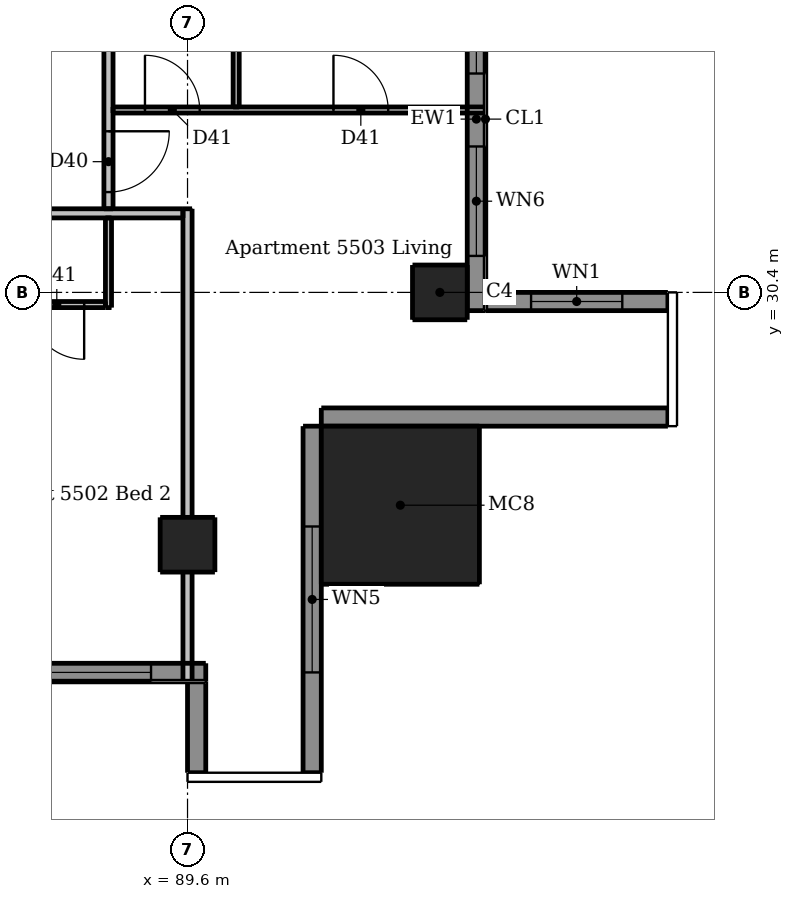
"""IFC4 building model, lengths in metres.
Left out: names, types, materials, properties, quantities, classifications, styles, units other than length and angle.
Written with IfcOpenShell. Run it as: python <this file> out.ifc"""

import sys

from ifc_helpers import new_model, si_unit, direction, frame, frame_2d, origin, origin_2d, place, context, subcontext, project, spatial, rectangle, extrude, element, fill, save


model = new_model("IFC4")
c1 = context("Model", 3, precision=1e-05, world=origin(), true_north=direction((0.0, 1.0)))
c2 = subcontext(c1, "Body", "Model", "MODEL_VIEW")
j1 = project(units=[si_unit("LENGTHUNIT", "METRE"), si_unit("PLANEANGLEUNIT", "RADIAN")], contexts=[c1])
p1 = place(None, origin())
s1 = spatial("IfcSite", under=j1, at=p1, CompositionType="ELEMENT")
p2 = place(p1, origin())
s2 = spatial("IfcBuilding", under=s1, at=p2, CompositionType="ELEMENT")
p3 = place(p2, frame((0.0, 0.0, 206.8)))
s3 = spatial("IfcBuildingStorey", under=s2, at=p3, CompositionType="ELEMENT", Elevation=206.8)
for number, where, z_axis, x_axis in (
    (1, (89.6, 26.25, 0.0), (0.0, 0.0, 1.0), (1.0, 0.0, 0.0)),
    (2, (93.75, 30.4, 0.0), (0.0, 0.0, 1.0), (1.0, 0.0, 0.0)),
):
    element("IfcColumn", number, at=place(p3, frame(where, z_axis=z_axis, x_axis=x_axis)), inside=s3, PredefinedType="COLUMN", context=c2, shape_type="SweptSolid", body=[
        extrude(rectangle(XDim=0.9, YDim=0.9, at=origin_2d()), origin(), (0.0, 0.0, 1.0), 3.05),
    ])
p4 = place(p3, frame((93.1, 26.9, 0.0), z_axis=(0.0, 0.0, 1.0), x_axis=(1.0, 0.0, 0.0)))
e3 = element("IfcColumn", 3, at=p4, inside=s3, PredefinedType="COLUMN", context=c2, shape_type="SweptSolid", body=[
    extrude(rectangle(XDim=2.6, YDim=2.6, at=origin_2d()), origin(), (0.0, 0.0, 1.0), 3.3),
])
p5 = place(p3, frame((89.75, 24.0, 0.0), z_axis=(0.0, 0.0, 1.0), x_axis=(0.0, -1.0, 0.0)))
e4 = element("IfcWall", 4, at=p5, inside=s3, PredefinedType="SOLIDWALL", context=c2, shape_type="SweptSolid", body=[
    extrude(rectangle(XDim=1.5, YDim=0.3, at=frame_2d((0.75, 0.0))), origin(), (0.0, 0.0, 1.0), 3.05),
])
p6 = place(p3, frame((91.65, 22.5, 0.0), z_axis=(0.0, 0.0, 1.0), x_axis=(0.0, 1.0, 0.0)))
e5 = element("IfcWall", 5, at=p6, inside=s3, PredefinedType="SOLIDWALL", context=c2, shape_type="SweptSolid", body=[
    extrude(rectangle(XDim=5.7, YDim=0.3, at=frame_2d((2.85, 0.0))), origin(), (0.0, 0.0, 1.0), 3.05),
])
p7 = place(p6, frame((1.65, 0.0, 0.15)))
e6 = element("IfcOpeningElement", 6, at=p7, cuts=e5, PredefinedType="OPENING", context=c2, shape_type="SweptSolid", body=[
    extrude(rectangle(XDim=2.4, YDim=2.1, at=frame_2d((1.2, 1.05))), frame((0.0, 0.16, 0.0), z_axis=(0.0, -1.0, 0.0), x_axis=(1.0, 0.0, 0.0)), (0.0, 0.0, 1.0), 0.32),
])
p8 = place(p3, frame((91.8, 28.35, 0.0), z_axis=(0.0, 0.0, 1.0), x_axis=(1.0, 0.0, 0.0)))
e7 = element("IfcWall", 7, at=p8, inside=s3, PredefinedType="SOLIDWALL", context=c2, shape_type="SweptSolid", body=[
    extrude(rectangle(XDim=5.7, YDim=0.3, at=frame_2d((2.85, 0.0))), origin(), (0.0, 0.0, 1.0), 3.05),
])
p9 = place(p3, frame((97.5, 30.25, 0.0), z_axis=(0.0, 0.0, 1.0), x_axis=(-1.0, 0.0, 0.0)))
e8 = element("IfcWall", 8, at=p9, inside=s3, PredefinedType="SOLIDWALL", context=c2, shape_type="SweptSolid", body=[
    extrude(rectangle(XDim=3.0, YDim=0.3, at=frame_2d((1.5, 0.0))), origin(), (0.0, 0.0, 1.0), 3.05),
])
p10 = place(p9, frame((0.75, 0.0, 0.9)))
e9 = element("IfcOpeningElement", 9, at=p10, cuts=e8, PredefinedType="OPENING", context=c2, shape_type="SweptSolid", body=[
    extrude(rectangle(XDim=1.5, YDim=1.5, at=frame_2d((0.75, 0.75))), frame((0.0, 0.16, 0.0), z_axis=(0.0, -1.0, 0.0), x_axis=(1.0, 0.0, 0.0)), (0.0, 0.0, 1.0), 0.32),
])
p11 = place(p3, frame((83.6, 24.15, 0.0), z_axis=(0.0, 0.0, 1.0), x_axis=(1.0, 0.0, 0.0)))
e10 = element("IfcWall", 10, at=p11, inside=s3, PredefinedType="SOLIDWALL", context=c2, shape_type="SweptSolid", body=[
    extrude(rectangle(XDim=6.3, YDim=0.3, at=frame_2d((3.15, 0.0))), origin(), (0.0, 0.0, 1.0), 3.05),
])
p12 = place(p11, frame((0.6, 0.0, 0.15)))
e11 = element("IfcOpeningElement", 11, at=p12, cuts=e10, PredefinedType="OPENING", context=c2, shape_type="SweptSolid", body=[
    extrude(rectangle(XDim=1.8, YDim=2.1, at=frame_2d((0.9, 1.05))), frame((0.0, 0.16, 0.0), z_axis=(0.0, -1.0, 0.0), x_axis=(1.0, 0.0, 0.0)), (0.0, 0.0, 1.0), 0.32),
])
p13 = place(p11, frame((3.6, 0.0, 0.15)))
e12 = element("IfcOpeningElement", 12, at=p13, cuts=e10, PredefinedType="OPENING", context=c2, shape_type="SweptSolid", body=[
    extrude(rectangle(XDim=1.8, YDim=2.1, at=frame_2d((0.9, 1.05))), frame((0.0, 0.16, 0.0), z_axis=(0.0, -1.0, 0.0), x_axis=(1.0, 0.0, 0.0)), (0.0, 0.0, 1.0), 0.32),
])
p14 = place(p3, frame((94.35, 30.1, 0.0), z_axis=(0.0, 0.0, 1.0), x_axis=(0.0, 1.0, 0.0)))
e13 = element("IfcWall", 13, at=p14, inside=s3, PredefinedType="SOLIDWALL", context=c2, shape_type="SweptSolid", body=[
    extrude(rectangle(XDim=6.3, YDim=0.3, at=frame_2d((3.15, 0.0))), origin(), (0.0, 0.0, 1.0), 3.05),
])
p15 = place(p14, frame((0.9, 0.0, 0.15)))
e14 = element("IfcOpeningElement", 14, at=p15, cuts=e13, PredefinedType="OPENING", context=c2, shape_type="SweptSolid", body=[
    extrude(rectangle(XDim=1.8, YDim=2.1, at=frame_2d((0.9, 1.05))), frame((0.0, 0.16, 0.0), z_axis=(0.0, -1.0, 0.0), x_axis=(1.0, 0.0, 0.0)), (0.0, 0.0, 1.0), 0.32),
])
p16 = place(p14, frame((3.9, 0.0, 0.15)))
e15 = element("IfcOpeningElement", 15, at=p16, cuts=e13, PredefinedType="OPENING", context=c2, shape_type="SweptSolid", body=[
    extrude(rectangle(XDim=1.8, YDim=2.1, at=frame_2d((0.9, 1.05))), frame((0.0, 0.16, 0.0), z_axis=(0.0, -1.0, 0.0), x_axis=(1.0, 0.0, 0.0)), (0.0, 0.0, 1.0), 0.32),
])
p17 = place(p3, frame((88.3, 30.15, 0.0), z_axis=(0.0, 0.0, 1.0), x_axis=(0.0, 1.0, 0.0)))
e16 = element("IfcWall", 16, at=p17, inside=s3, PredefinedType="PARTITIONING", context=c2, shape_type="SweptSolid", body=[
    extrude(rectangle(XDim=1.475, YDim=0.1, at=frame_2d((0.738, 0.0))), origin(), (0.0, 0.0, 1.0), 3.05),
])
p18 = place(p3, frame((90.4, 33.45, 0.0), z_axis=(0.0, 0.0, 1.0), x_axis=(0.0, 1.0, 0.0)))
e17 = element("IfcWall", 17, at=p18, inside=s3, PredefinedType="PARTITIONING", context=c2, shape_type="SweptSolid", body=[
    extrude(rectangle(XDim=5.875, YDim=0.1, at=frame_2d((2.938, 0.0))), origin(), (0.0, 0.0, 1.0), 3.05),
])
p19 = place(p18, frame((3.75, 0.0, 0.0)))
e18 = element("IfcOpeningElement", 18, at=p19, cuts=e17, PredefinedType="OPENING", context=c2, shape_type="SweptSolid", body=[
    extrude(rectangle(XDim=0.8, YDim=2.1, at=frame_2d((0.4, 1.05))), frame((0.0, 0.06, 0.0), z_axis=(0.0, -1.0, 0.0), x_axis=(1.0, 0.0, 0.0)), (0.0, 0.0, 1.0), 0.12),
])
p20 = place(p3, frame((88.375, 33.4, 0.0), z_axis=(0.0, 0.0, 1.0), x_axis=(1.0, 0.0, 0.0)))
e19 = element("IfcWall", 19, at=p20, inside=s3, PredefinedType="PARTITIONING", context=c2, shape_type="SweptSolid", body=[
    extrude(rectangle(XDim=6.125, YDim=0.1, at=frame_2d((3.062, 0.0))), origin(), (0.0, 0.0, 1.0), 3.05),
])
p21 = place(p20, frame((0.525, 0.0, 0.0)))
e20 = element("IfcOpeningElement", 20, at=p21, cuts=e19, PredefinedType="OPENING", context=c2, shape_type="SweptSolid", body=[
    extrude(rectangle(XDim=0.9, YDim=2.1, at=frame_2d((0.45, 1.05))), frame((0.0, 0.06, 0.0), z_axis=(0.0, -1.0, 0.0), x_axis=(1.0, 0.0, 0.0)), (0.0, 0.0, 1.0), 0.12),
])
p22 = place(p20, frame((3.625, 0.0, 0.0)))
e21 = element("IfcOpeningElement", 21, at=p22, cuts=e19, PredefinedType="OPENING", context=c2, shape_type="SweptSolid", body=[
    extrude(rectangle(XDim=0.9, YDim=2.1, at=frame_2d((0.45, 1.05))), frame((0.0, 0.06, 0.0), z_axis=(0.0, -1.0, 0.0), x_axis=(1.0, 0.0, 0.0)), (0.0, 0.0, 1.0), 0.12),
])
p23 = place(p3, frame((88.25, 30.2, 0.0), z_axis=(0.0, 0.0, 1.0), x_axis=(-1.0, 0.0, 0.0)))
e22 = element("IfcWall", 22, at=p23, inside=s3, PredefinedType="PARTITIONING", context=c2, shape_type="SweptSolid", body=[
    extrude(rectangle(XDim=16.575, YDim=0.1, at=frame_2d((8.288, 0.0))), origin(), (0.0, 0.0, 1.0), 3.05),
])
p24 = place(p23, frame((13.15, 0.0, 0.0)))
e23 = element("IfcOpeningElement", 23, at=p24, cuts=e22, PredefinedType="OPENING", context=c2, shape_type="SweptSolid", body=[
    extrude(rectangle(XDim=0.9, YDim=2.1, at=frame_2d((0.45, 1.05))), frame((0.0, 0.06, 0.0), z_axis=(0.0, -1.0, 0.0), x_axis=(1.0, 0.0, 0.0)), (0.0, 0.0, 1.0), 0.12),
])
p25 = place(p23, frame((8.6, 0.0, 0.0)))
e24 = element("IfcOpeningElement", 24, at=p25, cuts=e22, PredefinedType="OPENING", context=c2, shape_type="SweptSolid", body=[
    extrude(rectangle(XDim=0.9, YDim=2.1, at=frame_2d((0.45, 1.05))), frame((0.0, 0.06, 0.0), z_axis=(0.0, -1.0, 0.0), x_axis=(1.0, 0.0, 0.0)), (0.0, 0.0, 1.0), 0.12),
])
p26 = place(p23, frame((2.95, 0.0, 0.0)))
e25 = element("IfcOpeningElement", 25, at=p26, cuts=e22, PredefinedType="OPENING", context=c2, shape_type="SweptSolid", body=[
    extrude(rectangle(XDim=0.9, YDim=2.1, at=frame_2d((0.45, 1.05))), frame((0.0, 0.06, 0.0), z_axis=(0.0, -1.0, 0.0), x_axis=(1.0, 0.0, 0.0)), (0.0, 0.0, 1.0), 0.12),
])
p27 = place(p23, frame((0.35, 0.0, 0.0)))
e26 = element("IfcOpeningElement", 26, at=p27, cuts=e22, PredefinedType="OPENING", context=c2, shape_type="SweptSolid", body=[
    extrude(rectangle(XDim=0.9, YDim=2.1, at=frame_2d((0.45, 1.05))), frame((0.0, 0.06, 0.0), z_axis=(0.0, -1.0, 0.0), x_axis=(1.0, 0.0, 0.0)), (0.0, 0.0, 1.0), 0.12),
])
p28 = place(p23, frame((5.95, 0.0, 0.0)))
e27 = element("IfcOpeningElement", 27, at=p28, cuts=e22, PredefinedType="OPENING", context=c2, shape_type="SweptSolid", body=[
    extrude(rectangle(XDim=0.8, YDim=2.1, at=frame_2d((0.4, 1.05))), frame((0.0, 0.06, 0.0), z_axis=(0.0, -1.0, 0.0), x_axis=(1.0, 0.0, 0.0)), (0.0, 0.0, 1.0), 0.12),
])
p29 = place(p3, frame((88.3, 61.175, 0.0), z_axis=(0.0, 0.0, 1.0), x_axis=(0.0, -1.0, 0.0)))
e28 = element("IfcWall", 28, at=p29, inside=s3, PredefinedType="PARTITIONING", context=c2, shape_type="SweptSolid", body=[
    extrude(rectangle(XDim=29.4, YDim=0.15, at=frame_2d((14.7, 0.0))), origin(), (0.0, 0.0, 1.0), 3.05),
])
p30 = place(p29, frame((28.125, 0.0, 0.0)))
e29 = element("IfcOpeningElement", 29, at=p30, cuts=e28, PredefinedType="OPENING", context=c2, shape_type="SweptSolid", body=[
    extrude(rectangle(XDim=1.0, YDim=2.1, at=frame_2d((0.5, 1.05))), frame((0.0, 0.085, 0.0), z_axis=(0.0, -1.0, 0.0), x_axis=(1.0, 0.0, 0.0)), (0.0, 0.0, 1.0), 0.17),
])
p31 = place(p29, frame((10.775, 0.0, 0.0)))
e30 = element("IfcOpeningElement", 30, at=p31, cuts=e28, PredefinedType="OPENING", context=c2, shape_type="SweptSolid", body=[
    extrude(rectangle(XDim=1.0, YDim=2.1, at=frame_2d((0.5, 1.05))), frame((0.0, 0.085, 0.0), z_axis=(0.0, -1.0, 0.0), x_axis=(1.0, 0.0, 0.0)), (0.0, 0.0, 1.0), 0.17),
])
p32 = place(p3, frame((89.6, 24.0, 0.0), z_axis=(0.0, 0.0, 1.0), x_axis=(0.0, 1.0, 0.0)))
e31 = element("IfcWall", 31, at=p32, inside=s3, PredefinedType="PARTITIONING", context=c2, shape_type="SweptSolid", body=[
    extrude(rectangle(XDim=7.775, YDim=0.15, at=frame_2d((3.887, 0.0))), origin(), (0.0, 0.0, 1.0), 2.516),
])
p33 = place(p3, frame((89.525, 31.7, 0.0), z_axis=(0.0, 0.0, 1.0), x_axis=(-1.0, 0.0, 0.0)))
e32 = element("IfcWall", 32, at=p33, inside=s3, PredefinedType="PARTITIONING", context=c2, shape_type="SweptSolid", body=[
    extrude(rectangle(XDim=30.55, YDim=0.15, at=frame_2d((15.275, 0.0))), origin(), (0.0, 0.0, 1.0), 3.05),
])
p34 = place(p33, frame((26.775, 0.0, 0.0)))
e33 = element("IfcOpeningElement", 33, at=p34, cuts=e32, PredefinedType="OPENING", context=c2, shape_type="SweptSolid", body=[
    extrude(rectangle(XDim=1.0, YDim=2.1, at=frame_2d((0.5, 1.05))), frame((0.0, 0.085, 0.0), z_axis=(0.0, -1.0, 0.0), x_axis=(1.0, 0.0, 0.0)), (0.0, 0.0, 1.0), 0.17),
])
p35 = place(p33, frame((9.075, 0.0, 0.0)))
e34 = element("IfcOpeningElement", 34, at=p35, cuts=e32, PredefinedType="OPENING", context=c2, shape_type="SweptSolid", body=[
    extrude(rectangle(XDim=1.0, YDim=2.1, at=frame_2d((0.5, 1.05))), frame((0.0, 0.085, 0.0), z_axis=(0.0, -1.0, 0.0), x_axis=(1.0, 0.0, 0.0)), (0.0, 0.0, 1.0), 0.17),
])
p36 = place(p7, origin())
e35 = element("IfcWindow", 35, at=p36, inside=s3, PartitioningType="DOUBLE_PANEL_VERTICAL", PredefinedType="WINDOW", context=c2, shape_type="SweptSolid", body=[
    extrude(rectangle(XDim=2.4, YDim=2.1, at=frame_2d((1.2, 1.05))), frame((0.0, 0.03, 0.0), z_axis=(0.0, -1.0, 0.0), x_axis=(1.0, 0.0, 0.0)), (0.0, 0.0, 1.0), 0.06),
])
fill(e6, e35)
p37 = place(p10, origin())
e36 = element("IfcWindow", 36, at=p37, inside=s3, PartitioningType="DOUBLE_PANEL_VERTICAL", PredefinedType="WINDOW", context=c2, shape_type="SweptSolid", body=[
    extrude(rectangle(XDim=1.5, YDim=1.5, at=frame_2d((0.75, 0.75))), frame((0.0, 0.03, 0.0), z_axis=(0.0, -1.0, 0.0), x_axis=(1.0, 0.0, 0.0)), (0.0, 0.0, 1.0), 0.06),
])
fill(e9, e36)
p38 = place(p13, origin())
e37 = element("IfcWindow", 37, at=p38, inside=s3, PartitioningType="DOUBLE_PANEL_VERTICAL", PredefinedType="WINDOW", context=c2, shape_type="SweptSolid", body=[
    extrude(rectangle(XDim=1.8, YDim=2.1, at=frame_2d((0.9, 1.05))), frame((0.0, 0.03, 0.0), z_axis=(0.0, -1.0, 0.0), x_axis=(1.0, 0.0, 0.0)), (0.0, 0.0, 1.0), 0.06),
])
fill(e12, e37)
p39 = place(p15, origin())
e38 = element("IfcWindow", 38, at=p39, inside=s3, PartitioningType="DOUBLE_PANEL_VERTICAL", PredefinedType="WINDOW", context=c2, shape_type="SweptSolid", body=[
    extrude(rectangle(XDim=1.8, YDim=2.1, at=frame_2d((0.9, 1.05))), frame((0.0, 0.03, 0.0), z_axis=(0.0, -1.0, 0.0), x_axis=(1.0, 0.0, 0.0)), (0.0, 0.0, 1.0), 0.06),
])
fill(e14, e38)
p40 = place(p16, origin())
e39 = element("IfcWindow", 39, at=p40, inside=s3, PartitioningType="DOUBLE_PANEL_VERTICAL", PredefinedType="WINDOW", context=c2, shape_type="SweptSolid", body=[
    extrude(rectangle(XDim=1.8, YDim=2.1, at=frame_2d((0.9, 1.05))), frame((0.0, 0.03, 0.0), z_axis=(0.0, -1.0, 0.0), x_axis=(1.0, 0.0, 0.0)), (0.0, 0.0, 1.0), 0.06),
])
fill(e15, e39)
p41 = place(p27, origin())
e40 = element("IfcDoor", 40, at=p41, inside=s3, OperationType="SINGLE_SWING_LEFT", PredefinedType="DOOR", context=c2, shape_type="SweptSolid", body=[
    extrude(rectangle(XDim=0.9, YDim=2.1, at=frame_2d((0.45, 1.05))), frame((0.0, 0.025, 0.0), z_axis=(0.0, -1.0, 0.0), x_axis=(1.0, 0.0, 0.0)), (0.0, 0.0, 1.0), 0.05),
])
fill(e26, e40)
p42 = place(p30, origin())
e41 = element("IfcDoor", 41, at=p42, inside=s3, OperationType="SINGLE_SWING_LEFT", PredefinedType="DOOR", context=c2, shape_type="SweptSolid", body=[
    extrude(rectangle(XDim=1.0, YDim=2.1, at=frame_2d((0.5, 1.05))), frame((0.0, 0.025, 0.0), z_axis=(0.0, -1.0, 0.0), x_axis=(1.0, 0.0, 0.0)), (0.0, 0.0, 1.0), 0.05),
])
fill(e29, e41)
p43 = place(p21, origin())
e42 = element("IfcDoor", 42, at=p43, inside=s3, OperationType="SINGLE_SWING_LEFT", PredefinedType="DOOR", context=c2, shape_type="SweptSolid", body=[
    extrude(rectangle(XDim=0.9, YDim=2.1, at=frame_2d((0.45, 1.05))), frame((0.0, 0.025, 0.0), z_axis=(0.0, -1.0, 0.0), x_axis=(1.0, 0.0, 0.0)), (0.0, 0.0, 1.0), 0.05),
])
fill(e20, e42)
p44 = place(p22, origin())
e43 = element("IfcDoor", 43, at=p44, inside=s3, OperationType="SINGLE_SWING_LEFT", PredefinedType="DOOR", context=c2, shape_type="SweptSolid", body=[
    extrude(rectangle(XDim=0.9, YDim=2.1, at=frame_2d((0.45, 1.05))), frame((0.0, 0.025, 0.0), z_axis=(0.0, -1.0, 0.0), x_axis=(1.0, 0.0, 0.0)), (0.0, 0.0, 1.0), 0.05),
])
fill(e21, e43)
save(model, sys.argv[1])
